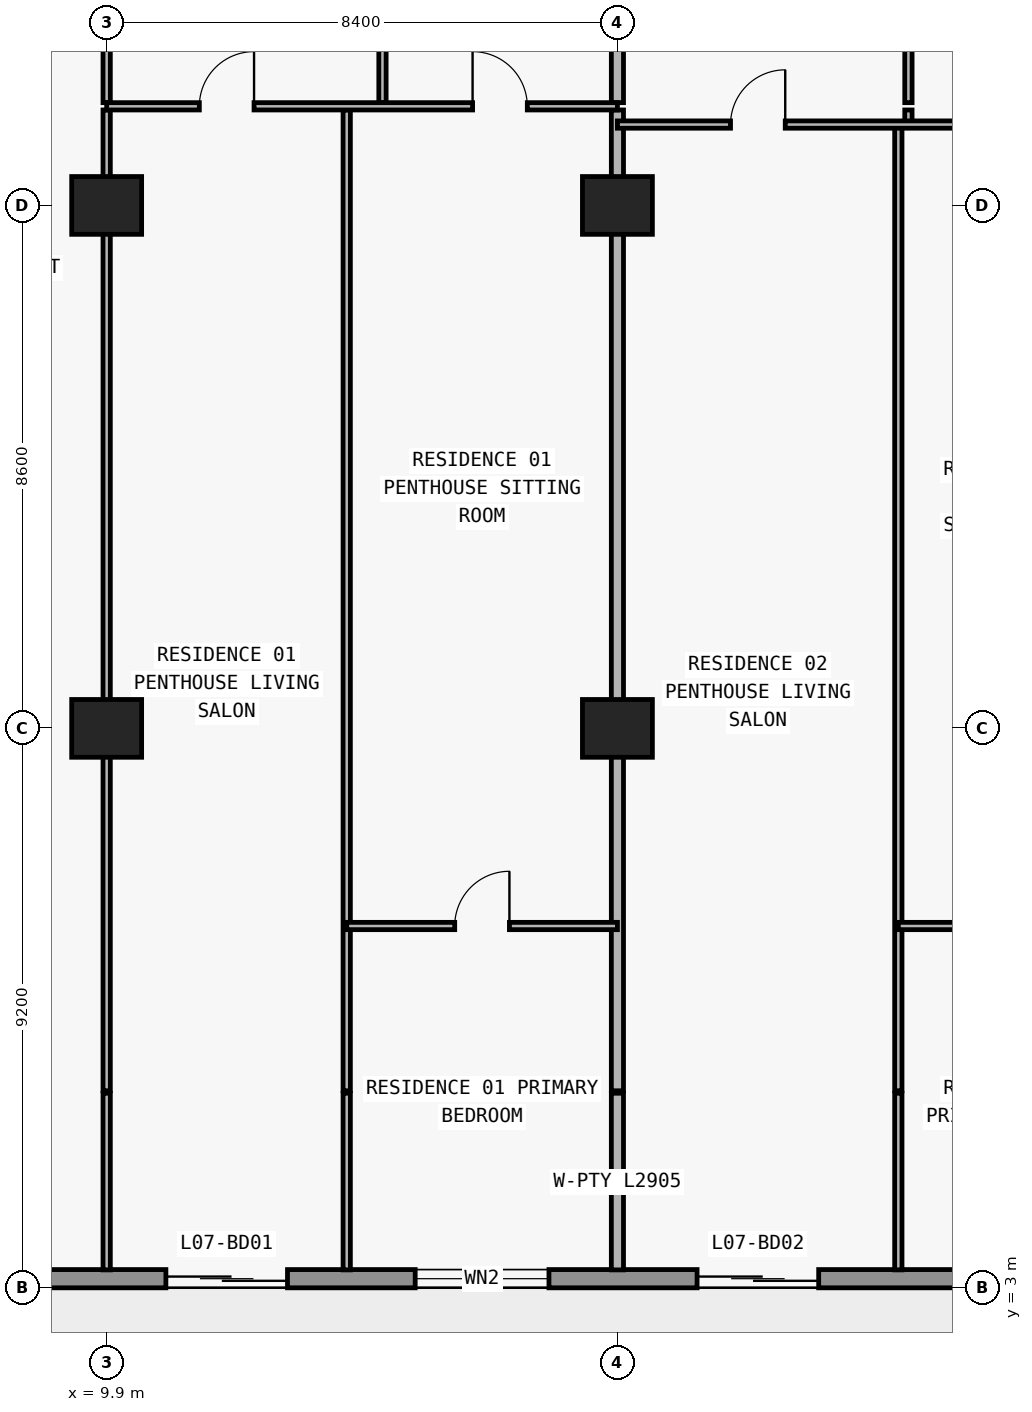
"""IFC4 building model, lengths in metres.
Left out: names, types, materials, properties, quantities, classifications, styles, units other than length and angle.
Written with IfcOpenShell. Run it as: python <this file> out.ifc"""

import sys

from ifc_helpers import new_model, si_unit, direction, frame, frame_2d, origin, origin_2d, place, context, subcontext, project, spatial, rectangle, extrude, element, fill, save


model = new_model("IFC4")
c1 = context("Model", 3, precision=1e-05, world=origin(), true_north=direction((0.0, 1.0)))
c2 = subcontext(c1, "Body", "Model", "MODEL_VIEW")
j1 = project(units=[si_unit("LENGTHUNIT", "METRE"), si_unit("PLANEANGLEUNIT", "RADIAN")], contexts=[c1])
p1 = place(None, origin())
s1 = spatial("IfcSite", under=j1, at=p1, CompositionType="ELEMENT")
p2 = place(p1, origin())
s2 = spatial("IfcBuilding", under=s1, at=p2, CompositionType="ELEMENT")
p3 = place(p2, frame((0.0, 0.0, 33.3)))
s3 = spatial("IfcBuildingStorey", under=s2, at=p3, CompositionType="ELEMENT", Elevation=33.3)
for number, where, z_axis, x_axis in (
    (1, (9.9, 12.2, 0.0), (0.0, 0.0, 1.0), (1.0, 0.0, 0.0)),
    (2, (18.3, 12.2, 0.0), (0.0, 0.0, 1.0), (1.0, 0.0, 0.0)),
    (3, (9.9, 20.8, 0.0), (0.0, 0.0, 1.0), (1.0, 0.0, 0.0)),
    (4, (18.3, 20.8, 0.0), (0.0, 0.0, 1.0), (1.0, 0.0, 0.0)),
):
    element("IfcColumn", number, at=place(p3, frame(where, z_axis=z_axis, x_axis=x_axis)), inside=s3, PredefinedType="COLUMN", context=c2, shape_type="SweptSolid", body=[
        extrude(rectangle(XDim=1.15, YDim=0.95, at=origin_2d()), origin(), (0.0, 0.0, 1.0), 3.05),
    ])
p4 = place(p3, frame((72.7, 3.15, 0.0), z_axis=(0.0, 0.0, 1.0), x_axis=(-1.0, 0.0, 0.0)))
e5 = element("IfcWall", 5, at=p4, inside=s3, PredefinedType="STANDARD", context=c2, shape_type="SweptSolid", body=[
    extrude(rectangle(XDim=67.6, YDim=0.3, at=frame_2d((33.8, 0.0))), origin(), (0.0, 0.0, 1.0), 3.05),
])
p5 = place(p4, frame((59.826, 0.0, 0.0)))
e6 = element("IfcOpeningElement", 6, at=p5, cuts=e5, PredefinedType="OPENING", context=c2, shape_type="SweptSolid", body=[
    extrude(rectangle(XDim=2.0, YDim=2.3, at=frame_2d((1.0, 1.15))), frame((0.0, 0.16, 0.0), z_axis=(0.0, -1.0, 0.0), x_axis=(1.0, 0.0, 0.0)), (0.0, 0.0, 1.0), 0.32),
])
p6 = place(p4, frame((55.526, 0.0, 0.85)))
e7 = element("IfcOpeningElement", 7, at=p6, cuts=e5, PredefinedType="OPENING", context=c2, shape_type="SweptSolid", body=[
    extrude(rectangle(XDim=2.2, YDim=1.55, at=frame_2d((1.1, 0.775))), frame((0.0, 0.16, 0.0), z_axis=(0.0, -1.0, 0.0), x_axis=(1.0, 0.0, 0.0)), (0.0, 0.0, 1.0), 0.32),
])
p7 = place(p4, frame((51.09, 0.0, 0.0)))
e8 = element("IfcOpeningElement", 8, at=p7, cuts=e5, PredefinedType="OPENING", context=c2, shape_type="SweptSolid", body=[
    extrude(rectangle(XDim=2.0, YDim=2.3, at=frame_2d((1.0, 1.15))), frame((0.0, 0.16, 0.0), z_axis=(0.0, -1.0, 0.0), x_axis=(1.0, 0.0, 0.0)), (0.0, 0.0, 1.0), 0.32),
])
p8 = place(p4, frame((46.99, 0.0, 0.85)))
e9 = element("IfcOpeningElement", 9, at=p8, cuts=e5, PredefinedType="OPENING", context=c2, shape_type="SweptSolid", body=[
    extrude(rectangle(XDim=1.8, YDim=1.55, at=frame_2d((0.9, 0.775))), frame((0.0, 0.16, 0.0), z_axis=(0.0, -1.0, 0.0), x_axis=(1.0, 0.0, 0.0)), (0.0, 0.0, 1.0), 0.32),
])
p9 = place(p4, frame((43.026, 0.0, 0.0)))
e10 = element("IfcOpeningElement", 10, at=p9, cuts=e5, PredefinedType="OPENING", context=c2, shape_type="SweptSolid", body=[
    extrude(rectangle(XDim=2.0, YDim=2.3, at=frame_2d((1.0, 1.15))), frame((0.0, 0.16, 0.0), z_axis=(0.0, -1.0, 0.0), x_axis=(1.0, 0.0, 0.0)), (0.0, 0.0, 1.0), 0.32),
])
p10 = place(p4, frame((38.726, 0.0, 0.85)))
e11 = element("IfcOpeningElement", 11, at=p10, cuts=e5, PredefinedType="OPENING", context=c2, shape_type="SweptSolid", body=[
    extrude(rectangle(XDim=2.2, YDim=1.55, at=frame_2d((1.1, 0.775))), frame((0.0, 0.16, 0.0), z_axis=(0.0, -1.0, 0.0), x_axis=(1.0, 0.0, 0.0)), (0.0, 0.0, 1.0), 0.32),
])
p11 = place(p4, frame((34.69, 0.0, 0.0)))
e12 = element("IfcOpeningElement", 12, at=p11, cuts=e5, PredefinedType="OPENING", context=c2, shape_type="SweptSolid", body=[
    extrude(rectangle(XDim=2.0, YDim=2.3, at=frame_2d((1.0, 1.15))), frame((0.0, 0.16, 0.0), z_axis=(0.0, -1.0, 0.0), x_axis=(1.0, 0.0, 0.0)), (0.0, 0.0, 1.0), 0.32),
])
p12 = place(p4, frame((30.81, 0.0, 0.65)))
e13 = element("IfcOpeningElement", 13, at=p12, cuts=e5, PredefinedType="OPENING", context=c2, shape_type="SweptSolid", body=[
    extrude(rectangle(XDim=2.6, YDim=1.85, at=frame_2d((1.3, 0.925))), frame((0.0, 0.16, 0.0), z_axis=(0.0, -1.0, 0.0), x_axis=(1.0, 0.0, 0.0)), (0.0, 0.0, 1.0), 0.32),
])
p13 = place(p4, frame((24.7, 0.0, 0.85)))
e14 = element("IfcOpeningElement", 14, at=p13, cuts=e5, PredefinedType="OPENING", context=c2, shape_type="SweptSolid", body=[
    extrude(rectangle(XDim=2.2, YDim=1.55, at=frame_2d((1.1, 0.775))), frame((0.0, 0.16, 0.0), z_axis=(0.0, -1.0, 0.0), x_axis=(1.0, 0.0, 0.0)), (0.0, 0.0, 1.0), 0.32),
])
p14 = place(p4, frame((18.626, 0.0, 0.0)))
e15 = element("IfcOpeningElement", 15, at=p14, cuts=e5, PredefinedType="OPENING", context=c2, shape_type="SweptSolid", body=[
    extrude(rectangle(XDim=2.0, YDim=2.3, at=frame_2d((1.0, 1.15))), frame((0.0, 0.16, 0.0), z_axis=(0.0, -1.0, 0.0), x_axis=(1.0, 0.0, 0.0)), (0.0, 0.0, 1.0), 0.32),
])
p15 = place(p4, frame((14.326, 0.0, 0.85)))
e16 = element("IfcOpeningElement", 16, at=p15, cuts=e5, PredefinedType="OPENING", context=c2, shape_type="SweptSolid", body=[
    extrude(rectangle(XDim=2.2, YDim=1.55, at=frame_2d((1.1, 0.775))), frame((0.0, 0.16, 0.0), z_axis=(0.0, -1.0, 0.0), x_axis=(1.0, 0.0, 0.0)), (0.0, 0.0, 1.0), 0.32),
])
p16 = place(p4, frame((9.89, 0.0, 0.0)))
e17 = element("IfcOpeningElement", 17, at=p16, cuts=e5, PredefinedType="OPENING", context=c2, shape_type="SweptSolid", body=[
    extrude(rectangle(XDim=2.0, YDim=2.3, at=frame_2d((1.0, 1.15))), frame((0.0, 0.16, 0.0), z_axis=(0.0, -1.0, 0.0), x_axis=(1.0, 0.0, 0.0)), (0.0, 0.0, 1.0), 0.32),
])
p17 = place(p4, frame((5.79, 0.0, 0.85)))
e18 = element("IfcOpeningElement", 18, at=p17, cuts=e5, PredefinedType="OPENING", context=c2, shape_type="SweptSolid", body=[
    extrude(rectangle(XDim=1.8, YDim=1.55, at=frame_2d((0.9, 0.775))), frame((0.0, 0.16, 0.0), z_axis=(0.0, -1.0, 0.0), x_axis=(1.0, 0.0, 0.0)), (0.0, 0.0, 1.0), 0.32),
])
p18 = place(p3, frame((9.9, 3.295, 0.0), z_axis=(0.0, 0.0, 1.0), x_axis=(0.0, 1.0, 0.0)))
e19 = element("IfcWall", 19, at=p18, inside=s3, PredefinedType="PARTITIONING", context=c2, shape_type="SweptSolid", body=[
    extrude(rectangle(XDim=2.905, YDim=0.12, at=frame_2d((1.453, 0.0))), origin(), (0.0, 0.0, 1.0), 3.05),
])
p19 = place(p3, frame((9.9, 6.24, 0.0), z_axis=(0.0, 0.0, 1.0), x_axis=(0.0, 1.0, 0.0)))
e20 = element("IfcWall", 20, at=p19, inside=s3, PredefinedType="PARTITIONING", context=c2, shape_type="SweptSolid", body=[
    extrude(rectangle(XDim=16.13, YDim=0.12, at=frame_2d((8.065, 0.0))), origin(), (0.0, 0.0, 1.0), 2.11),
])
p20 = place(p3, frame((9.9, 22.49, 0.0), z_axis=(0.0, 0.0, 1.0), x_axis=(0.0, 1.0, 0.0)))
e21 = element("IfcWall", 21, at=p20, inside=s3, PredefinedType="PARTITIONING", context=c2, shape_type="SweptSolid", body=[
    extrude(rectangle(XDim=4.69, YDim=0.12, at=frame_2d((2.345, 0.0))), origin(), (0.0, 0.0, 1.0), 2.11),
])
p21 = place(p20, frame((1.895, 0.0, 0.0)))
e22 = element("IfcOpeningElement", 22, at=p21, cuts=e21, PredefinedType="OPENING", context=c2, shape_type="SweptSolid", body=[
    extrude(rectangle(XDim=0.9, YDim=2.06, at=frame_2d((0.45, 1.03))), frame((0.0, 0.07, 0.0), z_axis=(0.0, -1.0, 0.0), x_axis=(1.0, 0.0, 0.0)), (0.0, 0.0, 1.0), 0.14),
])
p22 = place(p3, frame((13.848, 3.295, 0.0), z_axis=(0.0, 0.0, 1.0), x_axis=(0.0, 1.0, 0.0)))
e23 = element("IfcWall", 23, at=p22, inside=s3, PredefinedType="PARTITIONING", context=c2, shape_type="SweptSolid", body=[
    extrude(rectangle(XDim=2.905, YDim=0.12, at=frame_2d((1.453, 0.0))), origin(), (0.0, 0.0, 1.0), 3.05),
])
p23 = place(p3, frame((13.848, 6.24, 0.0), z_axis=(0.0, 0.0, 1.0), x_axis=(0.0, 1.0, 0.0)))
e24 = element("IfcWall", 24, at=p23, inside=s3, PredefinedType="PARTITIONING", context=c2, shape_type="SweptSolid", body=[
    extrude(rectangle(XDim=16.13, YDim=0.12, at=frame_2d((8.065, 0.0))), origin(), (0.0, 0.0, 1.0), 3.05),
])
p24 = place(p3, frame((14.436, 22.49, 0.0), z_axis=(0.0, 0.0, 1.0), x_axis=(0.0, 1.0, 0.0)))
e25 = element("IfcWall", 25, at=p24, inside=s3, PredefinedType="PARTITIONING", context=c2, shape_type="SweptSolid", body=[
    extrude(rectangle(XDim=4.69, YDim=0.12, at=frame_2d((2.345, 0.0))), origin(), (0.0, 0.0, 1.0), 3.05),
])
p25 = place(p24, frame((1.895, 0.0, 0.0)))
e26 = element("IfcOpeningElement", 26, at=p25, cuts=e25, PredefinedType="OPENING", context=c2, shape_type="SweptSolid", body=[
    extrude(rectangle(XDim=0.9, YDim=2.15, at=frame_2d((0.45, 1.075))), frame((0.0, 0.07, 0.0), z_axis=(0.0, -1.0, 0.0), x_axis=(1.0, 0.0, 0.0)), (0.0, 0.0, 1.0), 0.14),
])
p26 = place(p3, frame((18.3, 3.295, 0.0), z_axis=(0.0, 0.0, 1.0), x_axis=(0.0, 1.0, 0.0)))
e27 = element("IfcWall", 27, at=p26, inside=s3, PredefinedType="PARTITIONING", context=c2, shape_type="SweptSolid", body=[
    extrude(rectangle(XDim=2.905, YDim=0.2, at=frame_2d((1.453, 0.0))), origin(), (0.0, 0.0, 1.0), 3.05),
])
p27 = place(p3, frame((18.3, 6.24, 0.0), z_axis=(0.0, 0.0, 1.0), x_axis=(0.0, 1.0, 0.0)))
e28 = element("IfcWall", 28, at=p27, inside=s3, PredefinedType="PARTITIONING", context=c2, shape_type="SweptSolid", body=[
    extrude(rectangle(XDim=16.13, YDim=0.2, at=frame_2d((8.065, 0.0))), origin(), (0.0, 0.0, 1.0), 2.11),
])
p28 = place(p3, frame((18.3, 22.49, 0.0), z_axis=(0.0, 0.0, 1.0), x_axis=(0.0, 1.0, 0.0)))
e29 = element("IfcWall", 29, at=p28, inside=s3, PredefinedType="PARTITIONING", context=c2, shape_type="SweptSolid", body=[
    extrude(rectangle(XDim=4.69, YDim=0.2, at=frame_2d((2.345, 0.0))), origin(), (0.0, 0.0, 1.0), 2.11),
])
p29 = place(p3, frame((22.92, 3.295, 0.0), z_axis=(0.0, 0.0, 1.0), x_axis=(0.0, 1.0, 0.0)))
e30 = element("IfcWall", 30, at=p29, inside=s3, PredefinedType="PARTITIONING", context=c2, shape_type="SweptSolid", body=[
    extrude(rectangle(XDim=2.905, YDim=0.12, at=frame_2d((1.453, 0.0))), origin(), (0.0, 0.0, 1.0), 3.05),
])
p30 = place(p3, frame((22.92, 6.24, 0.0), z_axis=(0.0, 0.0, 1.0), x_axis=(0.0, 1.0, 0.0)))
e31 = element("IfcWall", 31, at=p30, inside=s3, PredefinedType="PARTITIONING", context=c2, shape_type="SweptSolid", body=[
    extrude(rectangle(XDim=15.89, YDim=0.12, at=frame_2d((7.945, 0.0))), origin(), (0.0, 0.0, 1.0), 3.05),
])
p31 = place(p3, frame((23.086, 22.135, 0.0), z_axis=(0.0, 0.0, 1.0), x_axis=(0.0, 1.0, 0.0)))
e32 = element("IfcWall", 32, at=p31, inside=s3, PredefinedType="PARTITIONING", context=c2, shape_type="SweptSolid", body=[
    extrude(rectangle(XDim=0.235, YDim=0.12, at=frame_2d((0.118, 0.0))), origin(), (0.0, 0.0, 1.0), 3.05),
])
p32 = place(p3, frame((23.086, 22.49, 0.0), z_axis=(0.0, 0.0, 1.0), x_axis=(0.0, 1.0, 0.0)))
e33 = element("IfcWall", 33, at=p32, inside=s3, PredefinedType="PARTITIONING", context=c2, shape_type="SweptSolid", body=[
    extrude(rectangle(XDim=4.69, YDim=0.12, at=frame_2d((2.345, 0.0))), origin(), (0.0, 0.0, 1.0), 3.05),
])
p33 = place(p32, frame((1.895, 0.0, 0.0)))
e34 = element("IfcOpeningElement", 34, at=p33, cuts=e33, PredefinedType="OPENING", context=c2, shape_type="SweptSolid", body=[
    extrude(rectangle(XDim=0.9, YDim=2.15, at=frame_2d((0.45, 1.075))), frame((0.0, 0.07, 0.0), z_axis=(0.0, -1.0, 0.0), x_axis=(1.0, 0.0, 0.0)), (0.0, 0.0, 1.0), 0.14),
])
p34 = place(p3, frame((13.848, 8.95, 0.0), z_axis=(0.0, 0.0, 1.0), x_axis=(1.0, 0.0, 0.0)))
e35 = element("IfcWall", 35, at=p34, inside=s3, PredefinedType="PARTITIONING", context=c2, shape_type="SweptSolid", body=[
    extrude(rectangle(XDim=4.452, YDim=0.12, at=frame_2d((2.226, 0.0))), origin(), (0.0, 0.0, 1.0), 3.05),
])
p35 = place(p34, frame((1.776, 0.0, 0.0)))
e36 = element("IfcOpeningElement", 36, at=p35, cuts=e35, PredefinedType="OPENING", context=c2, shape_type="SweptSolid", body=[
    extrude(rectangle(XDim=0.9, YDim=2.15, at=frame_2d((0.45, 1.075))), frame((0.0, 0.07, 0.0), z_axis=(0.0, -1.0, 0.0), x_axis=(1.0, 0.0, 0.0)), (0.0, 0.0, 1.0), 0.14),
])
p36 = place(p3, frame((22.92, 8.95, 0.0), z_axis=(0.0, 0.0, 1.0), x_axis=(1.0, 0.0, 0.0)))
e37 = element("IfcWall", 37, at=p36, inside=s3, PredefinedType="PARTITIONING", context=c2, shape_type="SweptSolid", body=[
    extrude(rectangle(XDim=3.78, YDim=0.12, at=frame_2d((1.89, 0.0))), origin(), (0.0, 0.0, 1.0), 3.05),
])
p37 = place(p36, frame((1.44, 0.0, 0.0)))
e38 = element("IfcOpeningElement", 38, at=p37, cuts=e37, PredefinedType="OPENING", context=c2, shape_type="SweptSolid", body=[
    extrude(rectangle(XDim=0.9, YDim=2.15, at=frame_2d((0.45, 1.075))), frame((0.0, 0.07, 0.0), z_axis=(0.0, -1.0, 0.0), x_axis=(1.0, 0.0, 0.0)), (0.0, 0.0, 1.0), 0.14),
])
p38 = place(p3, frame((18.3, 22.13, 0.0), z_axis=(0.0, 0.0, 1.0), x_axis=(1.0, 0.0, 0.0)))
e39 = element("IfcWall", 39, at=p38, inside=s3, PredefinedType="PARTITIONING", context=c2, shape_type="SweptSolid", body=[
    extrude(rectangle(XDim=8.13, YDim=0.12, at=frame_2d((4.065, 0.0))), origin(), (0.0, 0.0, 1.0), 3.05),
])
p39 = place(p38, frame((1.86, 0.0, 0.0)))
e40 = element("IfcOpeningElement", 40, at=p39, cuts=e39, PredefinedType="OPENING", context=c2, shape_type="SweptSolid", body=[
    extrude(rectangle(XDim=0.9, YDim=2.15, at=frame_2d((0.45, 1.075))), frame((0.0, 0.07, 0.0), z_axis=(0.0, -1.0, 0.0), x_axis=(1.0, 0.0, 0.0)), (0.0, 0.0, 1.0), 0.14),
])
p40 = place(p38, frame((6.008, 0.0, 0.0)))
e41 = element("IfcOpeningElement", 41, at=p40, cuts=e39, PredefinedType="OPENING", context=c2, shape_type="SweptSolid", body=[
    extrude(rectangle(XDim=0.9, YDim=2.15, at=frame_2d((0.45, 1.075))), frame((0.0, 0.07, 0.0), z_axis=(0.0, -1.0, 0.0), x_axis=(1.0, 0.0, 0.0)), (0.0, 0.0, 1.0), 0.14),
])
p41 = place(p3, frame((9.9, 22.43, 0.0), z_axis=(0.0, 0.0, 1.0), x_axis=(1.0, 0.0, 0.0)))
e42 = element("IfcWall", 42, at=p41, inside=s3, PredefinedType="PARTITIONING", context=c2, shape_type="SweptSolid", body=[
    extrude(rectangle(XDim=8.4, YDim=0.12, at=frame_2d((4.2, 0.0))), origin(), (0.0, 0.0, 1.0), 3.05),
])
p42 = place(p41, frame((1.524, 0.0, 0.0)))
e43 = element("IfcOpeningElement", 43, at=p42, cuts=e42, PredefinedType="OPENING", context=c2, shape_type="SweptSolid", body=[
    extrude(rectangle(XDim=0.9, YDim=2.15, at=frame_2d((0.45, 1.075))), frame((0.0, 0.07, 0.0), z_axis=(0.0, -1.0, 0.0), x_axis=(1.0, 0.0, 0.0)), (0.0, 0.0, 1.0), 0.14),
])
p43 = place(p41, frame((6.018, 0.0, 0.0)))
e44 = element("IfcOpeningElement", 44, at=p43, cuts=e42, PredefinedType="OPENING", context=c2, shape_type="SweptSolid", body=[
    extrude(rectangle(XDim=0.9, YDim=2.15, at=frame_2d((0.45, 1.075))), frame((0.0, 0.07, 0.0), z_axis=(0.0, -1.0, 0.0), x_axis=(1.0, 0.0, 0.0)), (0.0, 0.0, 1.0), 0.14),
])
p44 = place(p5, origin())
e45 = element("IfcDoor", 45, at=p44, inside=s3, OperationType="DOUBLE_DOOR_SLIDING", PredefinedType="DOOR", context=c2, shape_type="SweptSolid", body=[
    extrude(rectangle(XDim=2.0, YDim=2.3, at=frame_2d((1.0, 1.15))), frame((0.0, 0.025, 0.0), z_axis=(0.0, -1.0, 0.0), x_axis=(1.0, 0.0, 0.0)), (0.0, 0.0, 1.0), 0.05),
])
fill(e6, e45)
p45 = place(p6, origin())
e46 = element("IfcWindow", 46, at=p45, inside=s3, PartitioningType="SINGLE_PANEL", PredefinedType="WINDOW", context=c2, shape_type="SweptSolid", body=[
    extrude(rectangle(XDim=2.2, YDim=1.55, at=frame_2d((1.1, 0.775))), frame((0.0, 0.03, 0.0), z_axis=(0.0, -1.0, 0.0), x_axis=(1.0, 0.0, 0.0)), (0.0, 0.0, 1.0), 0.06),
])
fill(e7, e46)
p46 = place(p7, origin())
e47 = element("IfcDoor", 47, at=p46, inside=s3, OperationType="DOUBLE_DOOR_SLIDING", PredefinedType="DOOR", context=c2, shape_type="SweptSolid", body=[
    extrude(rectangle(XDim=2.0, YDim=2.3, at=frame_2d((1.0, 1.15))), frame((0.0, 0.025, 0.0), z_axis=(0.0, -1.0, 0.0), x_axis=(1.0, 0.0, 0.0)), (0.0, 0.0, 1.0), 0.05),
])
fill(e8, e47)
p47 = place(p42, origin())
e48 = element("IfcDoor", 48, at=p47, inside=s3, OperationType="SINGLE_SWING_RIGHT", PredefinedType="DOOR", context=c2, shape_type="SweptSolid", body=[
    extrude(rectangle(XDim=0.9, YDim=2.15, at=frame_2d((0.45, 1.075))), frame((0.0, 0.025, 0.0), z_axis=(0.0, -1.0, 0.0), x_axis=(1.0, 0.0, 0.0)), (0.0, 0.0, 1.0), 0.05),
])
fill(e43, e48)
p48 = place(p43, origin())
e49 = element("IfcDoor", 49, at=p48, inside=s3, OperationType="SINGLE_SWING_LEFT", PredefinedType="DOOR", context=c2, shape_type="SweptSolid", body=[
    extrude(rectangle(XDim=0.9, YDim=2.15, at=frame_2d((0.45, 1.075))), frame((0.0, 0.025, 0.0), z_axis=(0.0, -1.0, 0.0), x_axis=(1.0, 0.0, 0.0)), (0.0, 0.0, 1.0), 0.05),
])
fill(e44, e49)
p49 = place(p35, origin())
e50 = element("IfcDoor", 50, at=p49, inside=s3, OperationType="SINGLE_SWING_RIGHT", PredefinedType="DOOR", context=c2, shape_type="SweptSolid", body=[
    extrude(rectangle(XDim=0.9, YDim=2.15, at=frame_2d((0.45, 1.075))), frame((0.0, 0.025, 0.0), z_axis=(0.0, -1.0, 0.0), x_axis=(1.0, 0.0, 0.0)), (0.0, 0.0, 1.0), 0.05),
])
fill(e36, e50)
p50 = place(p39, origin())
e51 = element("IfcDoor", 51, at=p50, inside=s3, OperationType="SINGLE_SWING_RIGHT", PredefinedType="DOOR", context=c2, shape_type="SweptSolid", body=[
    extrude(rectangle(XDim=0.9, YDim=2.15, at=frame_2d((0.45, 1.075))), frame((0.0, 0.025, 0.0), z_axis=(0.0, -1.0, 0.0), x_axis=(1.0, 0.0, 0.0)), (0.0, 0.0, 1.0), 0.05),
])
fill(e40, e51)
save(model, sys.argv[1])
